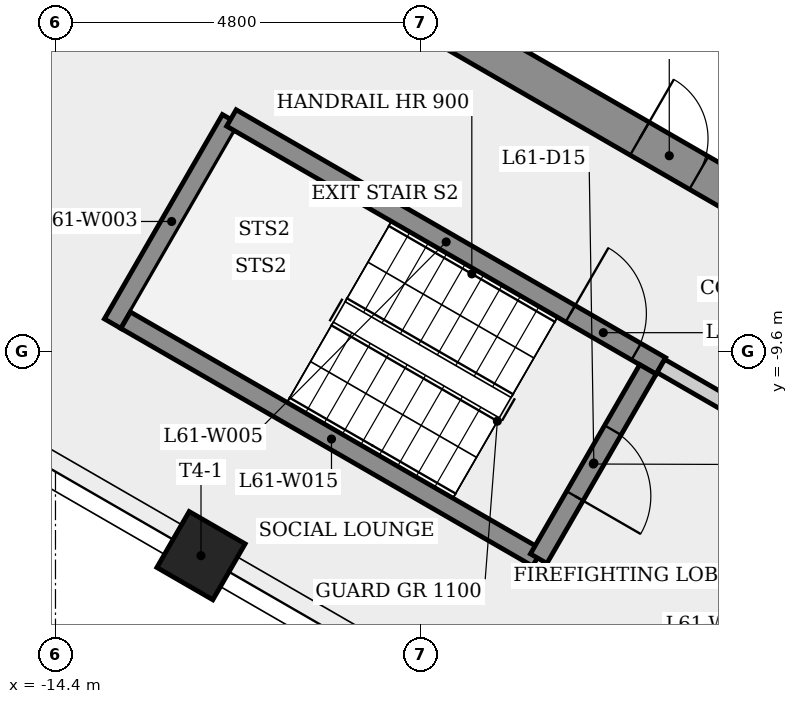
"""IFC4 building model, lengths in metres.
Left out: names, types, materials, properties, quantities, classifications, styles, units other than length and angle.
Written with IfcOpenShell. Run it as: python <this file> out.ifc"""

import sys

from ifc_helpers import new_model, si_unit, direction, frame, frame_2d, origin, origin_2d, place, context, subcontext, project, spatial, rectangle, extrude, element, fill, save


model = new_model("IFC4")
c1 = context("Model", 3, precision=1e-05, world=origin(), true_north=direction((0.0, 1.0)))
c2 = subcontext(c1, "Body", "Model", "MODEL_VIEW")
j1 = project(units=[si_unit("LENGTHUNIT", "METRE"), si_unit("PLANEANGLEUNIT", "RADIAN")], contexts=[c1])
p1 = place(None, origin())
s1 = spatial("IfcSite", under=j1, at=p1, CompositionType="ELEMENT")
p2 = place(p1, origin())
s2 = spatial("IfcBuilding", under=s1, at=p2, CompositionType="ELEMENT")
p3 = place(p2, frame((0.0, 0.0, 229.1)))
s3 = spatial("IfcBuildingStorey", under=s2, at=p3, CompositionType="ELEMENT", Elevation=229.1)
p4 = place(p3, frame((-9.375, -5.268, 0.0), z_axis=(0.0, 0.0, 1.0), x_axis=(0.866023993627, -0.500002442456, 0.0)))
e1 = element("IfcWall", 1, at=p4, inside=s3, PredefinedType="SHEAR", context=c2, shape_type="SweptSolid", body=[
    extrude(rectangle(XDim=10.97, YDim=0.5, at=frame_2d((5.485, 0.0))), origin(), (0.0, 0.0, 1.0), 3.4),
])
p5 = place(p4, frame((3.073, 0.0, 0.0)))
e2 = element("IfcOpeningElement", 2, at=p5, cuts=e1, PredefinedType="OPENING", context=c2, shape_type="SweptSolid", body=[
    extrude(rectangle(XDim=0.9, YDim=2.1, at=frame_2d((0.45, 1.05))), frame((0.0, 0.26, 0.0), z_axis=(0.0, -1.0, 0.0), x_axis=(1.0, 0.0, 0.0)), (0.0, 0.0, 1.0), 0.52),
])
p6 = place(p4, frame((8.267, 0.0, 0.0)))
e3 = element("IfcOpeningElement", 3, at=p6, cuts=e1, PredefinedType="OPENING", context=c2, shape_type="SweptSolid", body=[
    extrude(rectangle(XDim=0.9, YDim=2.1, at=frame_2d((0.45, 1.05))), frame((0.0, 0.26, 0.0), z_axis=(0.0, -1.0, 0.0), x_axis=(1.0, 0.0, 0.0)), (0.0, 0.0, 1.0), 0.52),
])
p7 = place(p3, frame((-12.485, -12.292, 0.0), z_axis=(0.0, 0.0, 1.0), x_axis=(-0.5, -0.866025403784, 0.0)))
e4 = element("IfcColumn", 4, at=p7, inside=s3, PredefinedType="COLUMN", context=c2, shape_type="SweptSolid", body=[
    extrude(rectangle(XDim=0.85, YDim=0.85, at=origin_2d()), origin(), (0.0, 0.0, 1.0), 3.4),
])
p8 = place(p3, frame((-13.648, -9.239, 0.0), z_axis=(0.0, 0.0, 1.0), x_axis=(0.500003782172, 0.866023220135, 0.0)))
e5 = element("IfcWall", 5, at=p8, inside=s3, PredefinedType="SHEAR", context=c2, shape_type="SweptSolid", body=[
    extrude(rectangle(XDim=3.105, YDim=0.25, at=frame_2d((1.552, 0.0))), origin(), (0.0, 0.0, 1.0), 3.05),
])
p9 = place(p3, frame((-12.085, -6.532, 0.0), z_axis=(0.0, 0.0, 1.0), x_axis=(0.866031063448, -0.499990197047, 0.0)))
e6 = element("IfcWall", 6, at=p9, inside=s3, PredefinedType="SHEAR", context=c2, shape_type="SweptSolid", body=[
    extrude(rectangle(XDim=6.525, YDim=0.25, at=frame_2d((3.263, 0.0))), origin(), (0.0, 0.0, 1.0), 3.05),
])
p10 = place(p9, frame((5.15, 0.0, 0.0)))
e7 = element("IfcOpeningElement", 7, at=p10, cuts=e6, PredefinedType="OPENING", context=c2, shape_type="SweptSolid", body=[
    extrude(rectangle(XDim=1.0, YDim=2.1, at=frame_2d((0.5, 1.05))), frame((0.0, 0.135, 0.0), z_axis=(0.0, -1.0, 0.0), x_axis=(1.0, 0.0, 0.0)), (0.0, 0.0, 1.0), 0.27),
])
p11 = place(p3, frame((-8.06, -12.321, 0.0), z_axis=(0.0, 0.0, 1.0), x_axis=(-0.866029591389, 0.499992746786, 0.0)))
e8 = element("IfcWall", 8, at=p11, inside=s3, PredefinedType="SHEAR", context=c2, shape_type="SweptSolid", body=[
    extrude(rectangle(XDim=6.255, YDim=0.25, at=frame_2d((3.127, 0.0))), origin(), (0.0, 0.0, 1.0), 3.05),
])
p12 = place(p3, frame((-6.605, -9.841, 0.0), z_axis=(0.0, 0.0, 1.0), x_axis=(-0.500011588718, -0.866018712932, 0.0)))
e9 = element("IfcWall", 9, at=p12, inside=s3, PredefinedType="SHEAR", context=c2, shape_type="SweptSolid", body=[
    extrude(rectangle(XDim=2.875, YDim=0.25, at=frame_2d((1.438, 0.0))), origin(), (0.0, 0.0, 1.0), 3.05),
])
p13 = place(p12, frame((0.923, 0.0, 0.0)))
e10 = element("IfcOpeningElement", 10, at=p13, cuts=e9, PredefinedType="OPENING", context=c2, shape_type="SweptSolid", body=[
    extrude(rectangle(XDim=1.0, YDim=2.1, at=frame_2d((0.5, 1.05))), frame((0.0, 0.135, 0.0), z_axis=(0.0, -1.0, 0.0), x_axis=(1.0, 0.0, 0.0)), (0.0, 0.0, 1.0), 0.27),
])
p14 = place(p3, frame((-6.435, -9.795, 0.0), z_axis=(0.0, 0.0, 1.0), x_axis=(0.866012907634, -0.500021643343, 0.0)))
e11 = element("IfcWall", 11, at=p14, inside=s3, PredefinedType="PARTITIONING", context=c2, shape_type="SweptSolid", body=[
    extrude(rectangle(XDim=4.45, YDim=0.2, at=frame_2d((2.225, 0.0))), origin(), (0.0, 0.0, 1.0), 3.05),
])
p15 = place(p14, frame((1.675, 0.0, 0.0)))
e12 = element("IfcOpeningElement", 12, at=p15, cuts=e11, PredefinedType="OPENING", context=c2, shape_type="SweptSolid", body=[
    extrude(rectangle(XDim=1.1, YDim=2.1, at=frame_2d((0.55, 1.05))), frame((0.0, 0.11, 0.0), z_axis=(0.0, -1.0, 0.0), x_axis=(1.0, 0.0, 0.0)), (0.0, 0.0, 1.0), 0.22),
])
p16 = place(p10, origin())
e13 = element("IfcDoor", 13, at=p16, inside=s3, OperationType="SINGLE_SWING_LEFT", PredefinedType="DOOR", context=c2, shape_type="SweptSolid", body=[
    extrude(rectangle(XDim=1.0, YDim=2.1, at=frame_2d((0.5, 1.05))), frame((0.0, 0.025, 0.0), z_axis=(0.0, -1.0, 0.0), x_axis=(1.0, 0.0, 0.0)), (0.0, 0.0, 1.0), 0.05),
])
fill(e7, e13)
p17 = place(p13, origin())
e14 = element("IfcDoor", 14, at=p17, inside=s3, OperationType="SINGLE_SWING_RIGHT", PredefinedType="DOOR", context=c2, shape_type="SweptSolid", body=[
    extrude(rectangle(XDim=1.0, YDim=2.1, at=frame_2d((0.5, 1.05))), frame((0.0, 0.025, 0.0), z_axis=(0.0, -1.0, 0.0), x_axis=(1.0, 0.0, 0.0)), (0.0, 0.0, 1.0), 0.05),
])
fill(e10, e14)
p18 = place(p5, origin())
e15 = element("IfcDoor", 15, at=p18, inside=s3, OperationType="SINGLE_SWING_LEFT", PredefinedType="DOOR", context=c2, shape_type="SweptSolid", body=[
    extrude(rectangle(XDim=0.9, YDim=2.1, at=frame_2d((0.45, 1.05))), frame((0.0, 0.025, 0.0), z_axis=(0.0, -1.0, 0.0), x_axis=(1.0, 0.0, 0.0)), (0.0, 0.0, 1.0), 0.05),
])
fill(e2, e15)
save(model, sys.argv[1])
